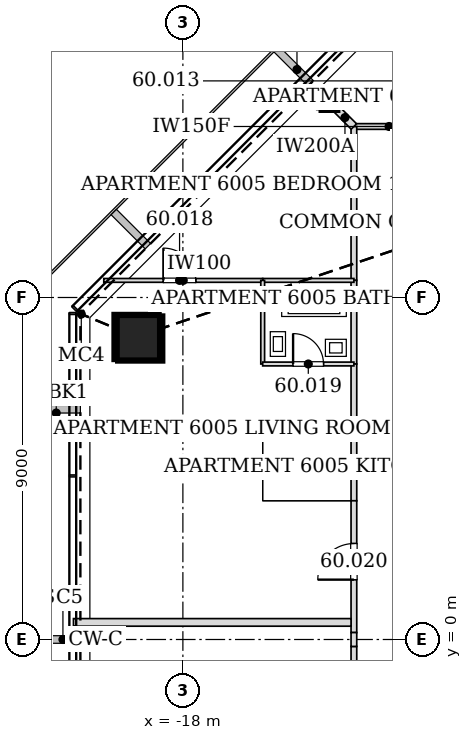
"""IFC4 building model, lengths in metres.
Left out: names, types, materials, properties, quantities, classifications, styles, units other than length and angle.
Written with IfcOpenShell. Run it as: python <this file> out.ifc"""

import sys

from ifc_helpers import new_model, si_unit, direction, frame, frame_2d, origin, origin_2d, place, context, subcontext, project, spatial, rectangle, hollow_rectangle, extrude, element, fill, save


model = new_model("IFC4")
c1 = context("Model", 3, precision=1e-05, world=origin(), true_north=direction((0.0, 1.0)))
c2 = subcontext(c1, "Body", "Model", "MODEL_VIEW")
j1 = project(units=[si_unit("LENGTHUNIT", "METRE"), si_unit("PLANEANGLEUNIT", "RADIAN")], contexts=[c1])
p1 = place(None, origin())
s1 = spatial("IfcSite", under=j1, at=p1, CompositionType="ELEMENT")
p2 = place(p1, origin())
s2 = spatial("IfcBuilding", under=s1, at=p2, CompositionType="ELEMENT")
p3 = place(p2, frame((0.0, 0.0, 251.6)))
s3 = spatial("IfcBuildingStorey", under=s2, at=p3, CompositionType="ELEMENT", Elevation=251.6)
p4 = place(p3, frame((-19.219, 7.961, 0.0), z_axis=(0.02827915051, -0.01169924247, 0.999531598986), x_axis=(0.382282742426, 0.924045401938, 0.0)))
e1 = element("IfcColumn", 1, at=p4, inside=s3, PredefinedType="COLUMN", context=c2, shape_type="SweptSolid", body=[
    extrude(hollow_rectangle(XDim=1.2, YDim=1.2, WallThickness=0.055, at=origin_2d()), origin(), (0.0, 0.0, 1.0), 3.402),
])
for number, where, z_axis, x_axis in (
    (2, (-14.211, 14.211, 0.0), (0.02, -0.02, 1.0), (0.707, 0.707, 0.0)),
    (3, (-20.097, 0.0, 0.0), (0.028, 0.0, 1.0), (0.0, 1.0, 0.0)),
):
    element("IfcColumn", number, at=place(p3, frame(where, z_axis=z_axis, x_axis=x_axis)), inside=s3, PredefinedType="COLUMN", context=c2, shape_type="SweptSolid", body=[
        extrude(hollow_rectangle(XDim=0.45, YDim=0.45, WallThickness=0.02, at=origin_2d()), origin(), (0.0, 0.0, 1.0), 3.401),
    ])
p5 = place(p3, frame((-11.649, 13.5, 0.0), z_axis=(0.0, 0.0, 1.0), x_axis=(-1.0, 0.0, 0.0)))
e4 = element("IfcWall", 4, at=p5, inside=s3, PredefinedType="PARTITIONING", context=c2, shape_type="SweptSolid", body=[
    extrude(rectangle(XDim=1.851, YDim=0.15, at=frame_2d((0.926, 0.0))), origin(), (0.0, 0.0, 1.0), 2.588),
])
p6 = place(p3, frame((-13.5, 13.5, 0.0), z_axis=(0.0, 0.0, 1.0), x_axis=(0.0, -1.0, 0.0)))
e5 = element("IfcWall", 5, at=p6, inside=s3, PredefinedType="PARTITIONING", context=c2, shape_type="SweptSolid", body=[
    extrude(rectangle(XDim=4.051, YDim=0.15, at=frame_2d((2.025, 0.0))), origin(), (0.0, 0.0, 1.0), 2.349),
])
p7 = place(p3, frame((-13.5, 9.451, 0.0), z_axis=(0.0, 0.0, 1.0), x_axis=(0.0, -1.0, 0.0)))
e6 = element("IfcWall", 6, at=p7, inside=s3, PredefinedType="PARTITIONING", context=c2, shape_type="SweptSolid", body=[
    extrude(rectangle(XDim=2.202, YDim=0.15, at=frame_2d((1.101, 0.0))), origin(), (0.0, 0.0, 1.0), 3.2),
])
p8 = place(p3, frame((-13.5, 5.451, 0.0), z_axis=(0.0, 0.0, 1.0), x_axis=(0.0, -1.0, 0.0)))
e7 = element("IfcWall", 7, at=p8, inside=s3, PredefinedType="PARTITIONING", context=c2, shape_type="SweptSolid", body=[
    extrude(rectangle(XDim=1.802, YDim=0.15, at=frame_2d((0.901, 0.0))), origin(), (0.0, 0.0, 1.0), 3.2),
])
p9 = place(p3, frame((-13.5, 3.651, 0.0), z_axis=(0.0, 0.0, 1.0), x_axis=(0.0, -1.0, 0.0)))
e8 = element("IfcWall", 8, at=p9, inside=s3, PredefinedType="PARTITIONING", context=c2, shape_type="SweptSolid", body=[
    extrude(rectangle(XDim=3.469, YDim=0.15, at=frame_2d((1.734, 0.0))), origin(), (0.0, 0.0, 1.0), 3.2),
])
p10 = place(p9, frame((1.126, 0.0, 0.0)))
e9 = element("IfcOpeningElement", 9, at=p10, cuts=e8, PredefinedType="OPENING", context=c2, shape_type="SweptSolid", body=[
    extrude(rectangle(XDim=0.95, YDim=2.1, at=frame_2d((0.475, 1.05))), frame((0.0, 0.085, 0.0), z_axis=(0.0, -1.0, 0.0), x_axis=(1.0, 0.0, 0.0)), (0.0, 0.0, 1.0), 0.17),
])
p11 = place(p3, frame((-13.5, 7.251, 0.0), z_axis=(0.0, 0.0, 1.0), x_axis=(0.0, -1.0, 0.0)))
e10 = element("IfcWall", 10, at=p11, inside=s3, PredefinedType="PARTITIONING", context=c2, shape_type="SweptSolid", body=[
    extrude(rectangle(XDim=1.802, YDim=0.15, at=frame_2d((0.901, 0.0))), origin(), (0.0, 0.0, 1.0), 3.2),
])
p12 = place(p3, frame((-13.5, -0.182, 0.0), z_axis=(0.0, 0.0, 1.0), x_axis=(0.0, -1.0, 0.0)))
e11 = element("IfcWall", 11, at=p12, inside=s3, PredefinedType="PARTITIONING", context=c2, shape_type="SweptSolid", body=[
    extrude(rectangle(XDim=3.469, YDim=0.15, at=frame_2d((1.734, 0.0))), origin(), (0.0, 0.0, 1.0), 3.2),
])
p13 = place(p3, frame((-13.5, 0.182, 0.0), z_axis=(0.0, 0.0, 1.0), x_axis=(0.0, -1.0, 0.0)))
e12 = element("IfcWall", 12, at=p13, inside=s3, PredefinedType="PARTITIONING", context=c2, shape_type="SweptSolid", body=[
    extrude(rectangle(XDim=0.365, YDim=0.15, at=frame_2d((0.182, 0.0))), origin(), (0.0, 0.0, 1.0), 2.268),
])
p14 = place(p3, frame((-13.97, 13.97, 0.0), z_axis=(0.0, 0.0, 1.0), x_axis=(0.707106781187, -0.707106781187, 0.0)))
e13 = element("IfcWall", 13, at=p14, inside=s3, PredefinedType="PARTITIONING", context=c2, shape_type="SweptSolid", body=[
    extrude(rectangle(XDim=0.665, YDim=0.2, at=frame_2d((0.333, 0.0))), origin(), (0.0, 0.0, 1.0), 2.588),
])
p15 = place(p3, frame((-15.901, 9.45, 0.0), z_axis=(0.0, 0.0, 1.0), x_axis=(1.0, 0.0, 0.0)))
e14 = element("IfcWall", 14, at=p15, inside=s3, PredefinedType="PARTITIONING", context=c2, shape_type="SweptSolid", body=[
    extrude(rectangle(XDim=2.401, YDim=0.1, at=frame_2d((1.2, 0.0))), origin(), (0.0, 0.0, 1.0), 2.349),
])
p16 = place(p3, frame((-20.082, 9.45, 0.0), z_axis=(0.0, 0.0, 1.0), x_axis=(1.0, 0.0, 0.0)))
e15 = element("IfcWall", 15, at=p16, inside=s3, PredefinedType="PARTITIONING", context=c2, shape_type="SweptSolid", body=[
    extrude(rectangle(XDim=4.183, YDim=0.1, at=frame_2d((2.091, 0.0))), origin(), (0.0, 0.0, 1.0), 2.74),
])
p17 = place(p16, frame((1.569, 0.0, 0.0)))
e16 = element("IfcOpeningElement", 16, at=p17, cuts=e15, PredefinedType="OPENING", context=c2, shape_type="SweptSolid", body=[
    extrude(rectangle(XDim=0.85, YDim=2.1, at=frame_2d((0.425, 1.05))), frame((0.0, 0.06, 0.0), z_axis=(0.0, -1.0, 0.0), x_axis=(1.0, 0.0, 0.0)), (0.0, 0.0, 1.0), 0.12),
])
p18 = place(p3, frame((-15.9, 9.45, 0.0), z_axis=(0.0, 0.0, 1.0), x_axis=(0.0, -1.0, 0.0)))
e17 = element("IfcWall", 17, at=p18, inside=s3, PredefinedType="PARTITIONING", context=c2, shape_type="SweptSolid", body=[
    extrude(rectangle(XDim=2.2, YDim=0.1, at=frame_2d((1.1, 0.0))), origin(), (0.0, 0.0, 1.0), 2.349),
])
p19 = place(p3, frame((-15.9, 7.25, 0.0), z_axis=(0.0, 0.0, 1.0), x_axis=(1.0, 0.0, 0.0)))
e18 = element("IfcWall", 18, at=p19, inside=s3, PredefinedType="PARTITIONING", context=c2, shape_type="SweptSolid", body=[
    extrude(rectangle(XDim=2.4, YDim=0.1, at=frame_2d((1.2, 0.0))), origin(), (0.0, 0.0, 1.0), 2.783),
])
p20 = place(p19, frame((0.8, 0.0, 0.0)))
e19 = element("IfcOpeningElement", 19, at=p20, cuts=e18, PredefinedType="OPENING", context=c2, shape_type="SweptSolid", body=[
    extrude(rectangle(XDim=0.8, YDim=2.1, at=frame_2d((0.4, 1.05))), frame((0.0, 0.06, 0.0), z_axis=(0.0, -1.0, 0.0), x_axis=(1.0, 0.0, 0.0)), (0.0, 0.0, 1.0), 0.12),
])
p21 = place(p3, frame((-20.879, 0.45, 0.0), z_axis=(0.0, 0.0, 1.0), x_axis=(1.0, 0.0, 0.0)))
e20 = element("IfcWall", 20, at=p21, inside=s3, PredefinedType="PARTITIONING", context=c2, shape_type="SweptSolid", body=[
    extrude(rectangle(XDim=7.304, YDim=0.2, at=frame_2d((3.652, 0.0))), origin(), (0.0, 0.0, 1.0), 2.662),
])
p22 = place(p17, origin())
e21 = element("IfcDoor", 21, at=p22, inside=s3, OperationType="SINGLE_SWING_LEFT", PredefinedType="DOOR", context=c2, shape_type="SweptSolid", body=[
    extrude(rectangle(XDim=0.85, YDim=2.1, at=frame_2d((0.425, 1.05))), frame((0.0, 0.025, 0.0), z_axis=(0.0, -1.0, 0.0), x_axis=(1.0, 0.0, 0.0)), (0.0, 0.0, 1.0), 0.05),
])
fill(e16, e21)
p23 = place(p20, origin())
e22 = element("IfcDoor", 22, at=p23, inside=s3, OperationType="SINGLE_SWING_LEFT", PredefinedType="DOOR", context=c2, shape_type="SweptSolid", body=[
    extrude(rectangle(XDim=0.8, YDim=2.1, at=frame_2d((0.4, 1.05))), frame((0.0, 0.025, 0.0), z_axis=(0.0, -1.0, 0.0), x_axis=(1.0, 0.0, 0.0)), (0.0, 0.0, 1.0), 0.05),
])
fill(e19, e22)
p24 = place(p10, frame((0.95, 0.0, 0.0), z_axis=(0.0, 0.0, 1.0), x_axis=(-1.0, 0.0, 0.0)))
e23 = element("IfcDoor", 23, at=p24, inside=s3, OperationType="SINGLE_SWING_LEFT", PredefinedType="DOOR", context=c2, shape_type="SweptSolid", body=[
    extrude(rectangle(XDim=0.95, YDim=2.1, at=frame_2d((0.475, 1.05))), frame((0.0, 0.025, 0.0), z_axis=(0.0, -1.0, 0.0), x_axis=(1.0, 0.0, 0.0)), (0.0, 0.0, 1.0), 0.05),
])
fill(e9, e23)
save(model, sys.argv[1])
